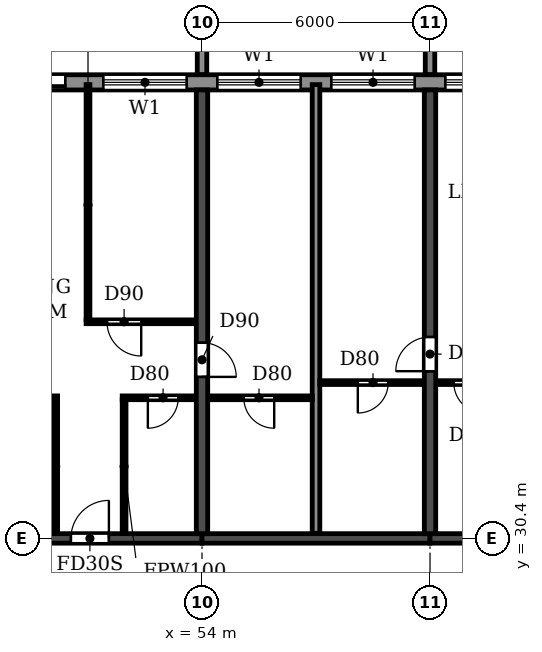
"""IFC4 building model, lengths in metres.
Left out: names, types, materials, properties, quantities, classifications, styles, units other than length and angle.
Written with IfcOpenShell. Run it as: python <this file> out.ifc"""

import sys

from ifc_helpers import new_model, si_unit, direction, frame, frame_2d, origin, place, context, subcontext, project, spatial, polyline, rectangle, outline, extrude, source, transform, mapped, element, fill, save


model = new_model("IFC4")
c1 = context("Model", 3, precision=1e-05, world=origin(), true_north=direction((0.0, 1.0)))
c2 = subcontext(c1, "Body", "Model", "MODEL_VIEW")
j1 = project(units=[si_unit("LENGTHUNIT", "METRE"), si_unit("PLANEANGLEUNIT", "RADIAN")], contexts=[c1])
p1 = place(None, origin())
s1 = spatial("IfcSite", under=j1, at=p1, CompositionType="ELEMENT")
p2 = place(p1, origin())
s2 = spatial("IfcBuilding", under=s1, at=p2, CompositionType="ELEMENT")
p3 = place(p2, frame((0.0, 0.0, 122.4)))
s3 = spatial("IfcBuildingStorey", under=s2, at=p3, CompositionType="ELEMENT", Elevation=122.4)
p4 = place(p3, frame((54.0, 30.525, 0.0), z_axis=(0.0, 0.0, 1.0), x_axis=(0.0, 1.0, 0.0)))
e1 = element("IfcWall", 1, at=p4, inside=s3, PredefinedType="SHEAR", context=c2, shape_type="SweptSolid", body=[
    extrude(rectangle(XDim=11.675, YDim=0.3, at=frame_2d((5.837, 0.0))), origin(), (0.0, 0.0, 1.0), 3.07),
])
p5 = place(p4, frame((4.125, 0.0, 0.0)))
e2 = element("IfcOpeningElement", 2, at=p5, cuts=e1, PredefinedType="OPENING", context=c2, shape_type="SweptSolid", body=[
    extrude(rectangle(XDim=0.9, YDim=2.1, at=frame_2d((0.45, 1.05))), frame((0.0, 0.16, 0.0), z_axis=(0.0, -1.0, 0.0), x_axis=(1.0, 0.0, 0.0)), (0.0, 0.0, 1.0), 0.32),
])
p6 = place(p3, frame((60.0, 30.525, 0.0), z_axis=(0.0, 0.0, 1.0), x_axis=(0.0, 1.0, 0.0)))
e3 = element("IfcWall", 3, at=p6, inside=s3, PredefinedType="SHEAR", context=c2, shape_type="SweptSolid", body=[
    extrude(rectangle(XDim=11.675, YDim=0.3, at=frame_2d((5.837, 0.0))), origin(), (0.0, 0.0, 1.0), 3.07),
])
p7 = place(p6, frame((4.275, 0.0, 0.0)))
e4 = element("IfcOpeningElement", 4, at=p7, cuts=e3, PredefinedType="OPENING", context=c2, shape_type="SweptSolid", body=[
    extrude(rectangle(XDim=0.9, YDim=2.1, at=frame_2d((0.45, 1.05))), frame((0.0, 0.16, 0.0), z_axis=(0.0, -1.0, 0.0), x_axis=(1.0, 0.0, 0.0)), (0.0, 0.0, 1.0), 0.32),
])
p8 = place(p3, frame((48.0, 30.4, 0.0), z_axis=(0.0, 0.0, 1.0), x_axis=(1.0, 0.0, 0.0)))
e5 = element("IfcWall", 5, at=p8, inside=s3, PredefinedType="SHEAR", context=c2, shape_type="SweptSolid", body=[
    extrude(rectangle(XDim=6.0, YDim=0.25, at=frame_2d((3.0, 0.0))), origin(), (0.0, 0.0, 1.0), 2.47),
])
p9 = place(p8, frame((2.55, 0.0, 0.0)))
e6 = element("IfcOpeningElement", 6, at=p9, cuts=e5, PredefinedType="OPENING", context=c2, shape_type="SweptSolid", body=[
    extrude(rectangle(XDim=1.0, YDim=2.1, at=frame_2d((0.5, 1.05))), frame((0.0, 0.135, 0.0), z_axis=(0.0, -1.0, 0.0), x_axis=(1.0, 0.0, 0.0)), (0.0, 0.0, 1.0), 0.27),
])
p10 = place(p3, frame((54.0, 30.4, 0.0), z_axis=(0.0, 0.0, 1.0), x_axis=(1.0, 0.0, 0.0)))
e7 = element("IfcWall", 7, at=p10, inside=s3, PredefinedType="SHEAR", context=c2, shape_type="SweptSolid", body=[
    extrude(rectangle(XDim=6.0, YDim=0.25, at=frame_2d((3.0, 0.0))), origin(), (0.0, 0.0, 1.0), 2.47),
])
p11 = place(p3, frame((60.0, 30.4, 0.0), z_axis=(0.0, 0.0, 1.0), x_axis=(1.0, 0.0, 0.0)))
e8 = element("IfcWall", 8, at=p11, inside=s3, PredefinedType="SHEAR", context=c2, shape_type="SweptSolid", body=[
    extrude(rectangle(XDim=6.0, YDim=0.25, at=frame_2d((3.0, 0.0))), origin(), (0.0, 0.0, 1.0), 2.47),
])
p12 = place(p11, frame((2.45, 0.0, 0.0)))
e9 = element("IfcOpeningElement", 9, at=p12, cuts=e8, PredefinedType="OPENING", context=c2, shape_type="SweptSolid", body=[
    extrude(rectangle(XDim=1.0, YDim=2.1, at=frame_2d((0.5, 1.05))), frame((0.0, 0.135, 0.0), z_axis=(0.0, -1.0, 0.0), x_axis=(1.0, 0.0, 0.0)), (0.0, 0.0, 1.0), 0.27),
])
p13 = place(p3, frame((85.317, 42.4, 0.0), z_axis=(0.0, 0.0, 1.0), x_axis=(-1.0, 0.0, 0.0)))
e10 = element("IfcWall", 10, at=p13, inside=s3, PredefinedType="STANDARD", context=c2, shape_type="SweptSolid", body=[
    extrude(rectangle(XDim=68.634, YDim=0.4, at=frame_2d((34.317, 0.0))), origin(), (0.0, 0.0, 1.0), 3.07),
])
p14 = place(p13, frame((64.717, 0.0, 0.9)))
e11 = element("IfcOpeningElement", 11, at=p14, cuts=e10, PredefinedType="OPENING", context=c2, shape_type="SweptSolid", body=[
    extrude(rectangle(XDim=2.2, YDim=1.5, at=frame_2d((1.1, 0.75))), frame((0.0, 0.21, 0.0), z_axis=(0.0, -1.0, 0.0), x_axis=(1.0, 0.0, 0.0)), (0.0, 0.0, 1.0), 0.42),
])
p15 = place(p13, frame((61.917, 0.0, 0.0)))
e12 = element("IfcOpeningElement", 12, at=p15, cuts=e10, PredefinedType="OPENING", context=c2, shape_type="SweptSolid", body=[
    extrude(rectangle(XDim=1.8, YDim=2.4, at=frame_2d((0.9, 1.2))), frame((0.0, 0.21, 0.0), z_axis=(0.0, -1.0, 0.0), x_axis=(1.0, 0.0, 0.0)), (0.0, 0.0, 1.0), 0.42),
])
p16 = place(p13, frame((58.717, 0.0, 0.9)))
e13 = element("IfcOpeningElement", 13, at=p16, cuts=e10, PredefinedType="OPENING", context=c2, shape_type="SweptSolid", body=[
    extrude(rectangle(XDim=2.2, YDim=1.5, at=frame_2d((1.1, 0.75))), frame((0.0, 0.21, 0.0), z_axis=(0.0, -1.0, 0.0), x_axis=(1.0, 0.0, 0.0)), (0.0, 0.0, 1.0), 0.42),
])
p17 = place(p13, frame((55.917, 0.0, 0.0)))
e14 = element("IfcOpeningElement", 14, at=p17, cuts=e10, PredefinedType="OPENING", context=c2, shape_type="SweptSolid", body=[
    extrude(rectangle(XDim=1.8, YDim=2.4, at=frame_2d((0.9, 1.2))), frame((0.0, 0.21, 0.0), z_axis=(0.0, -1.0, 0.0), x_axis=(1.0, 0.0, 0.0)), (0.0, 0.0, 1.0), 0.42),
])
p18 = place(p13, frame((52.717, 0.0, 0.9)))
e15 = element("IfcOpeningElement", 15, at=p18, cuts=e10, PredefinedType="OPENING", context=c2, shape_type="SweptSolid", body=[
    extrude(rectangle(XDim=2.2, YDim=1.5, at=frame_2d((1.1, 0.75))), frame((0.0, 0.21, 0.0), z_axis=(0.0, -1.0, 0.0), x_axis=(1.0, 0.0, 0.0)), (0.0, 0.0, 1.0), 0.42),
])
p19 = place(p13, frame((49.917, 0.0, 0.0)))
e16 = element("IfcOpeningElement", 16, at=p19, cuts=e10, PredefinedType="OPENING", context=c2, shape_type="SweptSolid", body=[
    extrude(rectangle(XDim=1.8, YDim=2.4, at=frame_2d((0.9, 1.2))), frame((0.0, 0.21, 0.0), z_axis=(0.0, -1.0, 0.0), x_axis=(1.0, 0.0, 0.0)), (0.0, 0.0, 1.0), 0.42),
])
p20 = place(p13, frame((46.717, 0.0, 0.9)))
e17 = element("IfcOpeningElement", 17, at=p20, cuts=e10, PredefinedType="OPENING", context=c2, shape_type="SweptSolid", body=[
    extrude(rectangle(XDim=2.2, YDim=1.5, at=frame_2d((1.1, 0.75))), frame((0.0, 0.21, 0.0), z_axis=(0.0, -1.0, 0.0), x_axis=(1.0, 0.0, 0.0)), (0.0, 0.0, 1.0), 0.42),
])
p21 = place(p13, frame((43.917, 0.0, 0.0)))
e18 = element("IfcOpeningElement", 18, at=p21, cuts=e10, PredefinedType="OPENING", context=c2, shape_type="SweptSolid", body=[
    extrude(rectangle(XDim=1.8, YDim=2.4, at=frame_2d((0.9, 1.2))), frame((0.0, 0.21, 0.0), z_axis=(0.0, -1.0, 0.0), x_axis=(1.0, 0.0, 0.0)), (0.0, 0.0, 1.0), 0.42),
])
p22 = place(p13, frame((40.717, 0.0, 0.9)))
e19 = element("IfcOpeningElement", 19, at=p22, cuts=e10, PredefinedType="OPENING", context=c2, shape_type="SweptSolid", body=[
    extrude(rectangle(XDim=2.2, YDim=1.5, at=frame_2d((1.1, 0.75))), frame((0.0, 0.21, 0.0), z_axis=(0.0, -1.0, 0.0), x_axis=(1.0, 0.0, 0.0)), (0.0, 0.0, 1.0), 0.42),
])
p23 = place(p13, frame((37.717, 0.0, 0.9)))
e20 = element("IfcOpeningElement", 20, at=p23, cuts=e10, PredefinedType="OPENING", context=c2, shape_type="SweptSolid", body=[
    extrude(rectangle(XDim=2.2, YDim=1.5, at=frame_2d((1.1, 0.75))), frame((0.0, 0.21, 0.0), z_axis=(0.0, -1.0, 0.0), x_axis=(1.0, 0.0, 0.0)), (0.0, 0.0, 1.0), 0.42),
])
p24 = place(p13, frame((34.917, 0.0, 0.0)))
e21 = element("IfcOpeningElement", 21, at=p24, cuts=e10, PredefinedType="OPENING", context=c2, shape_type="SweptSolid", body=[
    extrude(rectangle(XDim=1.8, YDim=2.4, at=frame_2d((0.9, 1.2))), frame((0.0, 0.21, 0.0), z_axis=(0.0, -1.0, 0.0), x_axis=(1.0, 0.0, 0.0)), (0.0, 0.0, 1.0), 0.42),
])
p25 = place(p13, frame((31.717, 0.0, 0.9)))
e22 = element("IfcOpeningElement", 22, at=p25, cuts=e10, PredefinedType="OPENING", context=c2, shape_type="SweptSolid", body=[
    extrude(rectangle(XDim=2.2, YDim=1.5, at=frame_2d((1.1, 0.75))), frame((0.0, 0.21, 0.0), z_axis=(0.0, -1.0, 0.0), x_axis=(1.0, 0.0, 0.0)), (0.0, 0.0, 1.0), 0.42),
])
p26 = place(p13, frame((28.717, 0.0, 0.9)))
e23 = element("IfcOpeningElement", 23, at=p26, cuts=e10, PredefinedType="OPENING", context=c2, shape_type="SweptSolid", body=[
    extrude(rectangle(XDim=2.2, YDim=1.5, at=frame_2d((1.1, 0.75))), frame((0.0, 0.21, 0.0), z_axis=(0.0, -1.0, 0.0), x_axis=(1.0, 0.0, 0.0)), (0.0, 0.0, 1.0), 0.42),
])
p27 = place(p13, frame((25.717, 0.0, 0.9)))
e24 = element("IfcOpeningElement", 24, at=p27, cuts=e10, PredefinedType="OPENING", context=c2, shape_type="SweptSolid", body=[
    extrude(rectangle(XDim=2.2, YDim=1.5, at=frame_2d((1.1, 0.75))), frame((0.0, 0.21, 0.0), z_axis=(0.0, -1.0, 0.0), x_axis=(1.0, 0.0, 0.0)), (0.0, 0.0, 1.0), 0.42),
])
p28 = place(p13, frame((22.717, 0.0, 0.9)))
e25 = element("IfcOpeningElement", 25, at=p28, cuts=e10, PredefinedType="OPENING", context=c2, shape_type="SweptSolid", body=[
    extrude(rectangle(XDim=2.2, YDim=1.5, at=frame_2d((1.1, 0.75))), frame((0.0, 0.21, 0.0), z_axis=(0.0, -1.0, 0.0), x_axis=(1.0, 0.0, 0.0)), (0.0, 0.0, 1.0), 0.42),
])
p29 = place(p13, frame((19.917, 0.0, 0.0)))
e26 = element("IfcOpeningElement", 26, at=p29, cuts=e10, PredefinedType="OPENING", context=c2, shape_type="SweptSolid", body=[
    extrude(rectangle(XDim=1.8, YDim=2.4, at=frame_2d((0.9, 1.2))), frame((0.0, 0.21, 0.0), z_axis=(0.0, -1.0, 0.0), x_axis=(1.0, 0.0, 0.0)), (0.0, 0.0, 1.0), 0.42),
])
p30 = place(p13, frame((16.917, 0.0, 0.0)))
e27 = element("IfcOpeningElement", 27, at=p30, cuts=e10, PredefinedType="OPENING", context=c2, shape_type="SweptSolid", body=[
    extrude(rectangle(XDim=1.8, YDim=2.4, at=frame_2d((0.9, 1.2))), frame((0.0, 0.21, 0.0), z_axis=(0.0, -1.0, 0.0), x_axis=(1.0, 0.0, 0.0)), (0.0, 0.0, 1.0), 0.42),
])
p31 = place(p13, frame((13.717, 0.0, 0.9)))
e28 = element("IfcOpeningElement", 28, at=p31, cuts=e10, PredefinedType="OPENING", context=c2, shape_type="SweptSolid", body=[
    extrude(rectangle(XDim=2.2, YDim=1.5, at=frame_2d((1.1, 0.75))), frame((0.0, 0.21, 0.0), z_axis=(0.0, -1.0, 0.0), x_axis=(1.0, 0.0, 0.0)), (0.0, 0.0, 1.0), 0.42),
])
p32 = place(p13, frame((10.717, 0.0, 0.9)))
e29 = element("IfcOpeningElement", 29, at=p32, cuts=e10, PredefinedType="OPENING", context=c2, shape_type="SweptSolid", body=[
    extrude(rectangle(XDim=2.2, YDim=1.5, at=frame_2d((1.1, 0.75))), frame((0.0, 0.21, 0.0), z_axis=(0.0, -1.0, 0.0), x_axis=(1.0, 0.0, 0.0)), (0.0, 0.0, 1.0), 0.42),
])
p33 = place(p13, frame((7.717, 0.0, 0.9)))
e30 = element("IfcOpeningElement", 30, at=p33, cuts=e10, PredefinedType="OPENING", context=c2, shape_type="SweptSolid", body=[
    extrude(rectangle(XDim=2.2, YDim=1.5, at=frame_2d((1.1, 0.75))), frame((0.0, 0.21, 0.0), z_axis=(0.0, -1.0, 0.0), x_axis=(1.0, 0.0, 0.0)), (0.0, 0.0, 1.0), 0.42),
])
p34 = place(p13, frame((4.917, 0.0, 0.0)))
e31 = element("IfcOpeningElement", 31, at=p34, cuts=e10, PredefinedType="OPENING", context=c2, shape_type="SweptSolid", body=[
    extrude(rectangle(XDim=1.8, YDim=2.4, at=frame_2d((0.9, 1.2))), frame((0.0, 0.21, 0.0), z_axis=(0.0, -1.0, 0.0), x_axis=(1.0, 0.0, 0.0)), (0.0, 0.0, 1.0), 0.42),
])
p35 = place(p13, frame((1.717, 0.0, 0.9)))
e32 = element("IfcOpeningElement", 32, at=p35, cuts=e10, PredefinedType="OPENING", context=c2, shape_type="SweptSolid", body=[
    extrude(rectangle(XDim=2.2, YDim=1.5, at=frame_2d((1.1, 0.75))), frame((0.0, 0.21, 0.0), z_axis=(0.0, -1.0, 0.0), x_axis=(1.0, 0.0, 0.0)), (0.0, 0.0, 1.0), 0.42),
])
m1 = source(origin(), c2, "Body", "SweptSolid", [
    extrude(outline(polyline([(0.0, 0.0), (0.25, 0.0), (0.25, 3.1), (0.0, 3.1), (0.0, 0.0)])), origin(), (0.0, 0.0, 1.0), 3.1),
])
for number, where in (
    (33, (53.875, 42.6, 0.0)),
    (34, (59.875, 42.6, 0.0)),
):
    element("IfcWall", number, at=place(p3, frame(where)), inside=s3, PredefinedType="STANDARD", context=c2, shape_type="MappedRepresentation", body=[
        mapped(m1, transform((0.0, 0.0, 0.0))),
    ])
p36 = place(p3, frame((57.0, 30.535, 0.0), z_axis=(0.0, 0.0, 1.0), x_axis=(0.0, 1.0, 0.0)))
e35 = element("IfcWall", 35, at=p36, inside=s3, PredefinedType="PARTITIONING", context=c2, shape_type="SweptSolid", body=[
    extrude(rectangle(XDim=11.805, YDim=0.2, at=frame_2d((5.903, 0.0))), origin(), (0.0, 0.0, 1.0), 3.07),
])
p37 = place(p3, frame((48.16, 34.1, 0.0), z_axis=(0.0, 0.0, 1.0), x_axis=(1.0, 0.0, 0.0)))
e36 = element("IfcWall", 36, at=p37, inside=s3, PredefinedType="PARTITIONING", context=c2, shape_type="SweptSolid", body=[
    extrude(rectangle(XDim=2.04, YDim=0.1, at=frame_2d((1.02, 0.0))), origin(), (0.0, 0.0, 1.0), 3.07),
])
p38 = place(p37, frame((0.465, 0.0, 0.0)))
e37 = element("IfcOpeningElement", 37, at=p38, cuts=e36, PredefinedType="OPENING", context=c2, shape_type="SweptSolid", body=[
    extrude(rectangle(XDim=0.9, YDim=2.1, at=frame_2d((0.45, 1.05))), frame((0.0, 0.06, 0.0), z_axis=(0.0, -1.0, 0.0), x_axis=(1.0, 0.0, 0.0)), (0.0, 0.0, 1.0), 0.12),
])
p39 = place(p3, frame((51.9, 34.1, 0.0), z_axis=(0.0, 0.0, 1.0), x_axis=(1.0, 0.0, 0.0)))
e38 = element("IfcWall", 38, at=p39, inside=s3, PredefinedType="PARTITIONING", context=c2, shape_type="SweptSolid", body=[
    extrude(rectangle(XDim=1.94, YDim=0.1, at=frame_2d((0.97, 0.0))), origin(), (0.0, 0.0, 1.0), 3.07),
])
p40 = place(p39, frame((0.675, 0.0, 0.0)))
e39 = element("IfcOpeningElement", 39, at=p40, cuts=e38, PredefinedType="OPENING", context=c2, shape_type="SweptSolid", body=[
    extrude(rectangle(XDim=0.8, YDim=2.1, at=frame_2d((0.4, 1.05))), frame((0.0, 0.06, 0.0), z_axis=(0.0, -1.0, 0.0), x_axis=(1.0, 0.0, 0.0)), (0.0, 0.0, 1.0), 0.12),
])
p41 = place(p3, frame((54.16, 34.1, 0.0), z_axis=(0.0, 0.0, 1.0), x_axis=(1.0, 0.0, 0.0)))
e40 = element("IfcWall", 40, at=p41, inside=s3, PredefinedType="PARTITIONING", context=c2, shape_type="SweptSolid", body=[
    extrude(rectangle(XDim=2.74, YDim=0.1, at=frame_2d((1.37, 0.0))), origin(), (0.0, 0.0, 1.0), 3.07),
])
p42 = place(p41, frame((0.94, 0.0, 0.0)))
e41 = element("IfcOpeningElement", 41, at=p42, cuts=e40, PredefinedType="OPENING", context=c2, shape_type="SweptSolid", body=[
    extrude(rectangle(XDim=0.8, YDim=2.1, at=frame_2d((0.4, 1.05))), frame((0.0, 0.06, 0.0), z_axis=(0.0, -1.0, 0.0), x_axis=(1.0, 0.0, 0.0)), (0.0, 0.0, 1.0), 0.12),
])
p43 = place(p3, frame((57.1, 34.5, 0.0), z_axis=(0.0, 0.0, 1.0), x_axis=(1.0, 0.0, 0.0)))
e42 = element("IfcWall", 42, at=p43, inside=s3, PredefinedType="PARTITIONING", context=c2, shape_type="SweptSolid", body=[
    extrude(rectangle(XDim=2.74, YDim=0.1, at=frame_2d((1.37, 0.0))), origin(), (0.0, 0.0, 1.0), 3.07),
])
p44 = place(p43, frame((1.0, 0.0, 0.0)))
e43 = element("IfcOpeningElement", 43, at=p44, cuts=e42, PredefinedType="OPENING", context=c2, shape_type="SweptSolid", body=[
    extrude(rectangle(XDim=0.8, YDim=2.1, at=frame_2d((0.4, 1.05))), frame((0.0, 0.06, 0.0), z_axis=(0.0, -1.0, 0.0), x_axis=(1.0, 0.0, 0.0)), (0.0, 0.0, 1.0), 0.12),
])
p45 = place(p3, frame((60.16, 34.5, 0.0), z_axis=(0.0, 0.0, 1.0), x_axis=(1.0, 0.0, 0.0)))
e44 = element("IfcWall", 44, at=p45, inside=s3, PredefinedType="PARTITIONING", context=c2, shape_type="SweptSolid", body=[
    extrude(rectangle(XDim=1.94, YDim=0.1, at=frame_2d((0.97, 0.0))), origin(), (0.0, 0.0, 1.0), 3.07),
])
p46 = place(p45, frame((0.465, 0.0, 0.0)))
e45 = element("IfcOpeningElement", 45, at=p46, cuts=e44, PredefinedType="OPENING", context=c2, shape_type="SweptSolid", body=[
    extrude(rectangle(XDim=0.8, YDim=2.1, at=frame_2d((0.4, 1.05))), frame((0.0, 0.06, 0.0), z_axis=(0.0, -1.0, 0.0), x_axis=(1.0, 0.0, 0.0)), (0.0, 0.0, 1.0), 0.12),
])
p47 = place(p3, frame((50.95, 36.1, 0.0), z_axis=(0.0, 0.0, 1.0), x_axis=(1.0, 0.0, 0.0)))
e46 = element("IfcWall", 46, at=p47, inside=s3, PredefinedType="PARTITIONING", context=c2, shape_type="SweptSolid", body=[
    extrude(rectangle(XDim=2.89, YDim=0.1, at=frame_2d((1.445, 0.0))), origin(), (0.0, 0.0, 1.0), 3.07),
])
p48 = place(p47, frame((0.55, 0.0, 0.0)))
e47 = element("IfcOpeningElement", 47, at=p48, cuts=e46, PredefinedType="OPENING", context=c2, shape_type="SweptSolid", body=[
    extrude(rectangle(XDim=0.9, YDim=2.1, at=frame_2d((0.45, 1.05))), frame((0.0, 0.06, 0.0), z_axis=(0.0, -1.0, 0.0), x_axis=(1.0, 0.0, 0.0)), (0.0, 0.0, 1.0), 0.12),
])
p49 = place(p3, frame((50.15, 30.535, 0.0), z_axis=(0.0, 0.0, 1.0), x_axis=(0.0, 1.0, 0.0)))
e48 = element("IfcWall", 48, at=p49, inside=s3, PredefinedType="PARTITIONING", context=c2, shape_type="SweptSolid", body=[
    extrude(rectangle(XDim=3.515, YDim=0.1, at=frame_2d((1.758, 0.0))), origin(), (0.0, 0.0, 1.0), 3.07),
])
p50 = place(p3, frame((51.0, 36.15, 0.0), z_axis=(0.0, 0.0, 1.0), x_axis=(0.0, 1.0, 0.0)))
e49 = element("IfcWall", 49, at=p50, inside=s3, PredefinedType="PARTITIONING", context=c2, shape_type="SweptSolid", body=[
    extrude(rectangle(XDim=6.19, YDim=0.1, at=frame_2d((3.095, 0.0))), origin(), (0.0, 0.0, 1.0), 3.07),
])
p51 = place(p3, frame((51.95, 30.535, 0.0), z_axis=(0.0, 0.0, 1.0), x_axis=(0.0, 1.0, 0.0)))
e50 = element("IfcWall", 50, at=p51, inside=s3, PredefinedType="PARTITIONING", context=c2, shape_type="SweptSolid", body=[
    extrude(rectangle(XDim=3.515, YDim=0.1, at=frame_2d((1.758, 0.0))), origin(), (0.0, 0.0, 1.0), 3.07),
])
p52 = place(p24, origin())
e51 = element("IfcDoor", 51, at=p52, inside=s3, OperationType="DOUBLE_DOOR_SLIDING", PredefinedType="DOOR", context=c2, shape_type="SweptSolid", body=[
    extrude(rectangle(XDim=1.8, YDim=2.4, at=frame_2d((0.9, 1.2))), frame((0.0, 0.025, 0.0), z_axis=(0.0, -1.0, 0.0), x_axis=(1.0, 0.0, 0.0)), (0.0, 0.0, 1.0), 0.05),
])
fill(e21, e51)
p53 = place(p25, origin())
e52 = element("IfcWindow", 52, at=p53, inside=s3, PartitioningType="DOUBLE_PANEL_HORIZONTAL", PredefinedType="WINDOW", context=c2, shape_type="SweptSolid", body=[
    extrude(rectangle(XDim=2.2, YDim=1.5, at=frame_2d((1.1, 0.75))), frame((0.0, 0.03, 0.0), z_axis=(0.0, -1.0, 0.0), x_axis=(1.0, 0.0, 0.0)), (0.0, 0.0, 1.0), 0.06),
])
fill(e22, e52)
p54 = place(p26, origin())
e53 = element("IfcWindow", 53, at=p54, inside=s3, PartitioningType="DOUBLE_PANEL_HORIZONTAL", PredefinedType="WINDOW", context=c2, shape_type="SweptSolid", body=[
    extrude(rectangle(XDim=2.2, YDim=1.5, at=frame_2d((1.1, 0.75))), frame((0.0, 0.03, 0.0), z_axis=(0.0, -1.0, 0.0), x_axis=(1.0, 0.0, 0.0)), (0.0, 0.0, 1.0), 0.06),
])
fill(e23, e53)
p55 = place(p27, origin())
e54 = element("IfcWindow", 54, at=p55, inside=s3, PartitioningType="DOUBLE_PANEL_HORIZONTAL", PredefinedType="WINDOW", context=c2, shape_type="SweptSolid", body=[
    extrude(rectangle(XDim=2.2, YDim=1.5, at=frame_2d((1.1, 0.75))), frame((0.0, 0.03, 0.0), z_axis=(0.0, -1.0, 0.0), x_axis=(1.0, 0.0, 0.0)), (0.0, 0.0, 1.0), 0.06),
])
fill(e24, e54)
p56 = place(p28, origin())
e55 = element("IfcWindow", 55, at=p56, inside=s3, PartitioningType="DOUBLE_PANEL_HORIZONTAL", PredefinedType="WINDOW", context=c2, shape_type="SweptSolid", body=[
    extrude(rectangle(XDim=2.2, YDim=1.5, at=frame_2d((1.1, 0.75))), frame((0.0, 0.03, 0.0), z_axis=(0.0, -1.0, 0.0), x_axis=(1.0, 0.0, 0.0)), (0.0, 0.0, 1.0), 0.06),
])
fill(e25, e55)
p57 = place(p42, frame((0.8, 0.0, 0.0), z_axis=(0.0, 0.0, 1.0), x_axis=(-1.0, 0.0, 0.0)))
e56 = element("IfcDoor", 56, at=p57, inside=s3, OperationType="SINGLE_SWING_LEFT", PredefinedType="DOOR", context=c2, shape_type="SweptSolid", body=[
    extrude(rectangle(XDim=0.8, YDim=2.1, at=frame_2d((0.4, 1.05))), frame((0.0, 0.025, 0.0), z_axis=(0.0, -1.0, 0.0), x_axis=(1.0, 0.0, 0.0)), (0.0, 0.0, 1.0), 0.05),
])
fill(e41, e56)
p58 = place(p9, origin())
e57 = element("IfcDoor", 57, at=p58, inside=s3, OperationType="SINGLE_SWING_RIGHT", PredefinedType="DOOR", context=c2, shape_type="SweptSolid", body=[
    extrude(rectangle(XDim=1.0, YDim=2.1, at=frame_2d((0.5, 1.05))), frame((0.0, 0.025, 0.0), z_axis=(0.0, -1.0, 0.0), x_axis=(1.0, 0.0, 0.0)), (0.0, 0.0, 1.0), 0.05),
])
fill(e6, e57)
p59 = place(p48, frame((0.9, 0.0, 0.0), z_axis=(0.0, 0.0, 1.0), x_axis=(-1.0, 0.0, 0.0)))
e58 = element("IfcDoor", 58, at=p59, inside=s3, OperationType="SINGLE_SWING_LEFT", PredefinedType="DOOR", context=c2, shape_type="SweptSolid", body=[
    extrude(rectangle(XDim=0.9, YDim=2.1, at=frame_2d((0.45, 1.05))), frame((0.0, 0.025, 0.0), z_axis=(0.0, -1.0, 0.0), x_axis=(1.0, 0.0, 0.0)), (0.0, 0.0, 1.0), 0.05),
])
fill(e47, e58)
p60 = place(p40, frame((0.8, 0.0, 0.0), z_axis=(0.0, 0.0, 1.0), x_axis=(-1.0, 0.0, 0.0)))
e59 = element("IfcDoor", 59, at=p60, inside=s3, OperationType="SINGLE_SWING_RIGHT", PredefinedType="DOOR", context=c2, shape_type="SweptSolid", body=[
    extrude(rectangle(XDim=0.8, YDim=2.1, at=frame_2d((0.4, 1.05))), frame((0.0, 0.025, 0.0), z_axis=(0.0, -1.0, 0.0), x_axis=(1.0, 0.0, 0.0)), (0.0, 0.0, 1.0), 0.05),
])
fill(e39, e59)
p61 = place(p5, frame((0.9, 0.0, 0.0), z_axis=(0.0, 0.0, 1.0), x_axis=(-1.0, 0.0, 0.0)))
e60 = element("IfcDoor", 60, at=p61, inside=s3, OperationType="SINGLE_SWING_RIGHT", PredefinedType="DOOR", context=c2, shape_type="SweptSolid", body=[
    extrude(rectangle(XDim=0.9, YDim=2.1, at=frame_2d((0.45, 1.05))), frame((0.0, 0.025, 0.0), z_axis=(0.0, -1.0, 0.0), x_axis=(1.0, 0.0, 0.0)), (0.0, 0.0, 1.0), 0.05),
])
fill(e2, e60)
p62 = place(p44, frame((0.8, 0.0, 0.0), z_axis=(0.0, 0.0, 1.0), x_axis=(-1.0, 0.0, 0.0)))
e61 = element("IfcDoor", 61, at=p62, inside=s3, OperationType="SINGLE_SWING_RIGHT", PredefinedType="DOOR", context=c2, shape_type="SweptSolid", body=[
    extrude(rectangle(XDim=0.8, YDim=2.1, at=frame_2d((0.4, 1.05))), frame((0.0, 0.025, 0.0), z_axis=(0.0, -1.0, 0.0), x_axis=(1.0, 0.0, 0.0)), (0.0, 0.0, 1.0), 0.05),
])
fill(e43, e61)
p63 = place(p7, origin())
e62 = element("IfcDoor", 62, at=p63, inside=s3, OperationType="SINGLE_SWING_LEFT", PredefinedType="DOOR", context=c2, shape_type="SweptSolid", body=[
    extrude(rectangle(XDim=0.9, YDim=2.1, at=frame_2d((0.45, 1.05))), frame((0.0, 0.025, 0.0), z_axis=(0.0, -1.0, 0.0), x_axis=(1.0, 0.0, 0.0)), (0.0, 0.0, 1.0), 0.05),
])
fill(e4, e62)
p64 = place(p46, frame((0.8, 0.0, 0.0), z_axis=(0.0, 0.0, 1.0), x_axis=(-1.0, 0.0, 0.0)))
e63 = element("IfcDoor", 63, at=p64, inside=s3, OperationType="SINGLE_SWING_LEFT", PredefinedType="DOOR", context=c2, shape_type="SweptSolid", body=[
    extrude(rectangle(XDim=0.8, YDim=2.1, at=frame_2d((0.4, 1.05))), frame((0.0, 0.025, 0.0), z_axis=(0.0, -1.0, 0.0), x_axis=(1.0, 0.0, 0.0)), (0.0, 0.0, 1.0), 0.05),
])
fill(e45, e63)
save(model, sys.argv[1])
